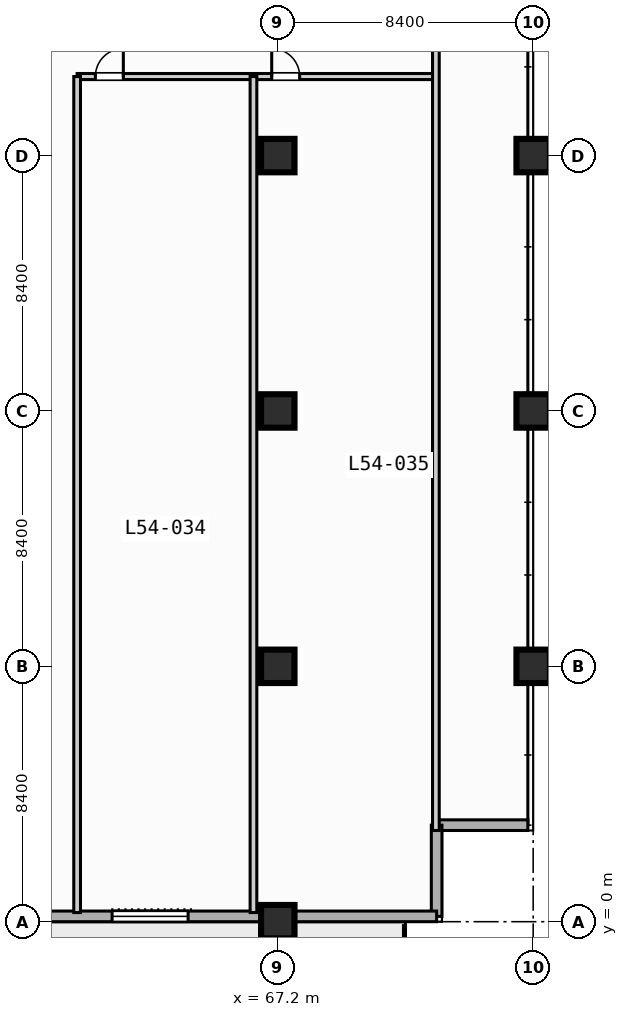
"""IFC4 building model, lengths in metres.
Left out: names, types, materials, properties, quantities, classifications, styles, units other than length and angle.
Written with IfcOpenShell. Run it as: python <this file> out.ifc"""

import sys

from ifc_helpers import new_model, si_unit, direction, frame, frame_2d, origin, origin_2d, place, context, subcontext, project, spatial, rectangle, extrude, element, fill, save


model = new_model("IFC4")
c1 = context("Model", 3, precision=1e-05, world=origin(), true_north=direction((0.0, 1.0)))
c2 = subcontext(c1, "Body", "Model", "MODEL_VIEW")
j1 = project(units=[si_unit("LENGTHUNIT", "METRE"), si_unit("PLANEANGLEUNIT", "RADIAN")], contexts=[c1])
p1 = place(None, origin())
s1 = spatial("IfcSite", under=j1, at=p1, CompositionType="ELEMENT")
p2 = place(p1, origin())
s2 = spatial("IfcBuilding", under=s1, at=p2, CompositionType="ELEMENT")
p3 = place(p2, frame((0.0, 0.0, 219.8)))
s3 = spatial("IfcBuildingStorey", under=s2, at=p3, CompositionType="ELEMENT", Elevation=219.8)
for number, where, z_axis, x_axis in (
    (1, (67.2, 0.0, 0.0), (0.0, 0.0, 1.0), (1.0, 0.0, 0.0)),
    (2, (67.2, 8.4, 0.0), (0.0, 0.0, 1.0), (1.0, 0.0, 0.0)),
    (3, (67.2, 16.8, 0.0), (0.0, 0.0, 1.0), (1.0, 0.0, 0.0)),
    (4, (67.2, 25.2, 0.0), (0.0, 0.0, 1.0), (1.0, 0.0, 0.0)),
    (5, (75.6, 8.4, 0.0), (0.0, 0.0, 1.0), (1.0, 0.0, 0.0)),
    (6, (75.6, 16.8, 0.0), (0.0, 0.0, 1.0), (1.0, 0.0, 0.0)),
    (7, (75.6, 25.2, 0.0), (0.0, 0.0, 1.0), (1.0, 0.0, 0.0)),
):
    element("IfcColumn", number, at=place(p3, frame(where, z_axis=z_axis, x_axis=x_axis)), inside=s3, PredefinedType="COLUMN", context=c2, shape_type="SweptSolid", body=[
        extrude(rectangle(XDim=1.1, YDim=1.1, at=origin_2d()), origin(), (0.0, 0.0, 1.0), 4.2),
    ])
for number, where, z_axis, x_axis in (
    (8, (75.425, 3.175, 0.0), (0.0, 0.0, 1.0), (-1.0, 0.0, 0.0)),
    (9, (72.425, 3.175, 0.0), (0.0, 0.0, 1.0), (0.0, -1.0, 0.0)),
):
    element("IfcWall", number, at=place(p3, frame(where, z_axis=z_axis, x_axis=x_axis)), inside=s3, PredefinedType="STANDARD", context=c2, shape_type="SweptSolid", body=[
        extrude(rectangle(XDim=3.0, YDim=0.35, at=frame_2d((1.5, 0.0))), origin(), (0.0, 0.0, 1.0), 3.97),
    ])
p4 = place(p3, frame((72.425, 0.175, 0.0), z_axis=(0.0, 0.0, 1.0), x_axis=(-1.0, 0.0, 0.0)))
e10 = element("IfcWall", 10, at=p4, inside=s3, PredefinedType="STANDARD", context=c2, shape_type="SweptSolid", body=[
    extrude(rectangle(XDim=69.25, YDim=0.35, at=frame_2d((34.625, 0.0))), origin(), (0.0, 0.0, 1.0), 3.97),
])
p5 = place(p4, frame((50.725, 0.0, 0.0)))
e11 = element("IfcOpeningElement", 11, at=p5, cuts=e10, PredefinedType="OPENING", context=c2, shape_type="SweptSolid", body=[
    extrude(rectangle(XDim=1.4, YDim=2.2, at=frame_2d((0.7, 1.1))), frame((0.0, 0.185, 0.0), z_axis=(0.0, -1.0, 0.0), x_axis=(1.0, 0.0, 0.0)), (0.0, 0.0, 1.0), 0.37),
])
p6 = place(p4, frame((24.975, 0.0, 0.85)))
e12 = element("IfcOpeningElement", 12, at=p6, cuts=e10, PredefinedType="OPENING", context=c2, shape_type="SweptSolid", body=[
    extrude(rectangle(XDim=2.5, YDim=2.2, at=frame_2d((1.25, 1.1))), frame((0.0, 0.185, 0.0), z_axis=(0.0, -1.0, 0.0), x_axis=(1.0, 0.0, 0.0)), (0.0, 0.0, 1.0), 0.37),
])
p7 = place(p4, frame((8.175, 0.0, 0.85)))
e13 = element("IfcOpeningElement", 13, at=p7, cuts=e10, PredefinedType="OPENING", context=c2, shape_type="SweptSolid", body=[
    extrude(rectangle(XDim=2.5, YDim=2.2, at=frame_2d((1.25, 1.1))), frame((0.0, 0.185, 0.0), z_axis=(0.0, -1.0, 0.0), x_axis=(1.0, 0.0, 0.0)), (0.0, 0.0, 1.0), 0.37),
])
p8 = place(p3, frame((60.6, 27.8, 0.0), z_axis=(0.0, 0.0, 1.0), x_axis=(1.0, 0.0, 0.0)))
e14 = element("IfcWall", 14, at=p8, inside=s3, PredefinedType="PARTITIONING", context=c2, shape_type="SweptSolid", body=[
    extrude(rectangle(XDim=11.8, YDim=0.2, at=frame_2d((5.9, 0.0))), origin(), (0.0, 0.0, 1.0), 3.97),
])
p9 = place(p8, frame((0.6, 0.0, 0.0)))
e15 = element("IfcOpeningElement", 15, at=p9, cuts=e14, PredefinedType="OPENING", context=c2, shape_type="SweptSolid", body=[
    extrude(rectangle(XDim=0.92, YDim=2.1, at=frame_2d((0.46, 1.05))), frame((0.0, 0.11, 0.0), z_axis=(0.0, -1.0, 0.0), x_axis=(1.0, 0.0, 0.0)), (0.0, 0.0, 1.0), 0.22),
])
p10 = place(p8, frame((6.4, 0.0, 0.0)))
e16 = element("IfcOpeningElement", 16, at=p10, cuts=e14, PredefinedType="OPENING", context=c2, shape_type="SweptSolid", body=[
    extrude(rectangle(XDim=0.92, YDim=2.1, at=frame_2d((0.46, 1.05))), frame((0.0, 0.11, 0.0), z_axis=(0.0, -1.0, 0.0), x_axis=(1.0, 0.0, 0.0)), (0.0, 0.0, 1.0), 0.22),
])
p11 = place(p3, frame((60.6, 0.3, 0.0), z_axis=(0.0, 0.0, 1.0), x_axis=(0.0, 1.0, 0.0)))
e17 = element("IfcWall", 17, at=p11, inside=s3, PredefinedType="PARTITIONING", context=c2, shape_type="SweptSolid", body=[
    extrude(rectangle(XDim=27.5, YDim=0.22, at=frame_2d((13.75, 0.0))), origin(), (0.0, 0.0, 1.0), 3.97),
])
p12 = place(p3, frame((72.4, 3.0, 0.0), z_axis=(0.0, 0.0, 1.0), x_axis=(0.0, 1.0, 0.0)))
e18 = element("IfcWall", 18, at=p12, inside=s3, PredefinedType="PARTITIONING", context=c2, shape_type="SweptSolid", body=[
    extrude(rectangle(XDim=27.4, YDim=0.22, at=frame_2d((13.7, 0.0))), origin(), (0.0, 0.0, 1.0), 3.97),
])
p13 = place(p3, frame((66.4, 0.3, 0.0), z_axis=(0.0, 0.0, 1.0), x_axis=(0.0, 1.0, 0.0)))
e19 = element("IfcWall", 19, at=p13, inside=s3, PredefinedType="PARTITIONING", context=c2, shape_type="SweptSolid", body=[
    extrude(rectangle(XDim=27.5, YDim=0.22, at=frame_2d((13.75, 0.0))), origin(), (0.0, 0.0, 1.0), 3.97),
])
p14 = place(p7, origin())
e20 = element("IfcWindow", 20, at=p14, inside=s3, PartitioningType="SINGLE_PANEL", PredefinedType="WINDOW", context=c2, shape_type="SweptSolid", body=[
    extrude(rectangle(XDim=2.5, YDim=2.2, at=frame_2d((1.25, 1.1))), frame((0.0, 0.03, 0.0), z_axis=(0.0, -1.0, 0.0), x_axis=(1.0, 0.0, 0.0)), (0.0, 0.0, 1.0), 0.06),
])
fill(e13, e20)
p15 = place(p9, origin())
e21 = element("IfcDoor", 21, at=p15, inside=s3, OperationType="SINGLE_SWING_RIGHT", PredefinedType="DOOR", context=c2, shape_type="SweptSolid", body=[
    extrude(rectangle(XDim=0.92, YDim=2.1, at=frame_2d((0.46, 1.05))), frame((0.0, 0.025, 0.0), z_axis=(0.0, -1.0, 0.0), x_axis=(1.0, 0.0, 0.0)), (0.0, 0.0, 1.0), 0.05),
])
fill(e15, e21)
p16 = place(p10, origin())
e22 = element("IfcDoor", 22, at=p16, inside=s3, OperationType="SINGLE_SWING_LEFT", PredefinedType="DOOR", context=c2, shape_type="SweptSolid", body=[
    extrude(rectangle(XDim=0.92, YDim=2.1, at=frame_2d((0.46, 1.05))), frame((0.0, 0.025, 0.0), z_axis=(0.0, -1.0, 0.0), x_axis=(1.0, 0.0, 0.0)), (0.0, 0.0, 1.0), 0.05),
])
fill(e16, e22)
save(model, sys.argv[1])
